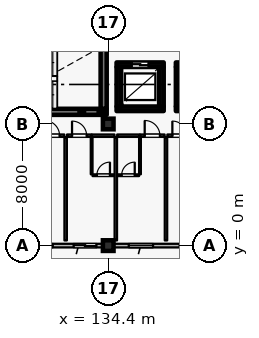
"""IFC4 building model, lengths in metres.
Left out: names, types, materials, properties, quantities, classifications, styles, units other than length and angle.
Written with IfcOpenShell. Run it as: python <this file> out.ifc"""

import sys

from ifc_helpers import new_model, si_unit, direction, frame, frame_2d, origin, origin_2d, place, context, subcontext, project, spatial, rectangle, hollow_rectangle, extrude, element, fill, save


model = new_model("IFC4")
c1 = context("Model", 3, precision=1e-05, world=origin(), true_north=direction((0.0, 1.0)))
c2 = subcontext(c1, "Body", "Model", "MODEL_VIEW")
j1 = project(units=[si_unit("LENGTHUNIT", "METRE"), si_unit("PLANEANGLEUNIT", "RADIAN")], contexts=[c1])
p1 = place(None, origin())
s1 = spatial("IfcSite", under=j1, at=p1, CompositionType="ELEMENT")
p2 = place(p1, origin())
s2 = spatial("IfcBuilding", under=s1, at=p2, CompositionType="ELEMENT")
p3 = place(p2, frame((0.0, 0.0, 28.8)))
s3 = spatial("IfcBuildingStorey", under=s2, at=p3, CompositionType="ELEMENT", Elevation=28.8)
for number, where, z_axis, x_axis in (
    (1, (134.4, 0.0, 0.0), (0.0, 0.0, 1.0), (1.0, 0.0, 0.0)),
    (2, (134.4, 8.0, 0.0), (0.0, 0.0, 1.0), (1.0, 0.0, 0.0)),
):
    element("IfcColumn", number, at=place(p3, frame(where, z_axis=z_axis, x_axis=x_axis)), inside=s3, PredefinedType="COLUMN", context=c2, shape_type="SweptSolid", body=[
        extrude(rectangle(XDim=0.7, YDim=0.7, at=origin_2d()), origin(), (0.0, 0.0, 1.0), 3.6),
    ])
p4 = place(p3, frame((134.05, 0.0, 0.0), z_axis=(0.0, 0.0, 1.0), x_axis=(-1.0, 0.0, 0.0)))
e3 = element("IfcWall", 3, at=p4, inside=s3, PredefinedType="SOLIDWALL", context=c2, shape_type="SweptSolid", body=[
    extrude(rectangle(XDim=7.7, YDim=0.24, at=frame_2d((3.85, 0.0))), origin(), (0.0, 0.0, 1.0), 2.93),
])
p5 = place(p4, frame((0.425, 0.0, 0.0)))
e4 = element("IfcOpeningElement", 4, at=p5, cuts=e3, PredefinedType="OPENING", context=c2, shape_type="SweptSolid", body=[
    extrude(rectangle(XDim=1.5, YDim=2.25, at=frame_2d((0.75, 1.125))), frame((0.0, 0.13, 0.0), z_axis=(0.0, -1.0, 0.0), x_axis=(1.0, 0.0, 0.0)), (0.0, 0.0, 1.0), 0.26),
])
p6 = place(p4, frame((3.3, 0.0, 0.8)))
e5 = element("IfcOpeningElement", 5, at=p6, cuts=e3, PredefinedType="OPENING", context=c2, shape_type="SweptSolid", body=[
    extrude(rectangle(XDim=1.6, YDim=1.6, at=frame_2d((0.8, 0.8))), frame((0.0, 0.13, 0.0), z_axis=(0.0, -1.0, 0.0), x_axis=(1.0, 0.0, 0.0)), (0.0, 0.0, 1.0), 0.26),
])
p7 = place(p4, frame((5.975, 0.0, 0.8)))
e6 = element("IfcOpeningElement", 6, at=p7, cuts=e3, PredefinedType="OPENING", context=c2, shape_type="SweptSolid", body=[
    extrude(rectangle(XDim=1.6, YDim=1.6, at=frame_2d((0.8, 0.8))), frame((0.0, 0.13, 0.0), z_axis=(0.0, -1.0, 0.0), x_axis=(1.0, 0.0, 0.0)), (0.0, 0.0, 1.0), 0.26),
])
p8 = place(p3, frame((142.45, 0.0, 0.0), z_axis=(0.0, 0.0, 1.0), x_axis=(-1.0, 0.0, 0.0)))
e7 = element("IfcWall", 7, at=p8, inside=s3, PredefinedType="SOLIDWALL", context=c2, shape_type="SweptSolid", body=[
    extrude(rectangle(XDim=7.7, YDim=0.24, at=frame_2d((3.85, 0.0))), origin(), (0.0, 0.0, 1.0), 2.93),
])
p9 = place(p8, frame((1.85, 0.0, 0.0)))
e8 = element("IfcOpeningElement", 8, at=p9, cuts=e7, PredefinedType="OPENING", context=c2, shape_type="SweptSolid", body=[
    extrude(rectangle(XDim=1.5, YDim=2.25, at=frame_2d((0.75, 1.125))), frame((0.0, 0.13, 0.0), z_axis=(0.0, -1.0, 0.0), x_axis=(1.0, 0.0, 0.0)), (0.0, 0.0, 1.0), 0.26),
])
p10 = place(p8, frame((5.1, 0.0, 0.8)))
e9 = element("IfcOpeningElement", 9, at=p10, cuts=e7, PredefinedType="OPENING", context=c2, shape_type="SweptSolid", body=[
    extrude(rectangle(XDim=1.6, YDim=1.6, at=frame_2d((0.8, 0.8))), frame((0.0, 0.13, 0.0), z_axis=(0.0, -1.0, 0.0), x_axis=(1.0, 0.0, 0.0)), (0.0, 0.0, 1.0), 0.26),
])
p11 = place(p3, frame((134.95, 9.0, 0.0), z_axis=(0.0, 0.0, 1.0), x_axis=(1.0, 0.0, 0.0)))
e10 = element("IfcWall", 10, at=p11, inside=s3, PredefinedType="SHEAR", context=c2, shape_type="SweptSolid", body=[
    extrude(rectangle(XDim=3.1, YDim=0.3, at=frame_2d((1.55, 0.0))), origin(), (0.0, 0.0, 1.0), 3.365),
])
p12 = place(p3, frame((137.9, 9.155, 0.0), z_axis=(0.0, 0.0, 1.0), x_axis=(0.0, 1.0, 0.0)))
e11 = element("IfcWall", 11, at=p12, inside=s3, PredefinedType="SHEAR", context=c2, shape_type="SweptSolid", body=[
    extrude(rectangle(XDim=2.59, YDim=0.3, at=frame_2d((1.295, 0.0))), origin(), (0.0, 0.0, 1.0), 3.365),
])
p13 = place(p3, frame((138.05, 11.9, 0.0), z_axis=(0.0, 0.0, 1.0), x_axis=(-1.0, 0.0, 0.0)))
e12 = element("IfcWall", 12, at=p13, inside=s3, PredefinedType="SHEAR", context=c2, shape_type="SweptSolid", body=[
    extrude(rectangle(XDim=3.1, YDim=0.3, at=frame_2d((1.55, 0.0))), origin(), (0.0, 0.0, 1.0), 3.365),
])
p14 = place(p13, frame((1.0, 0.0, 0.0)))
e13 = element("IfcOpeningElement", 13, at=p14, cuts=e12, PredefinedType="OPENING", context=c2, shape_type="SweptSolid", body=[
    extrude(rectangle(XDim=1.1, YDim=2.2, at=frame_2d((0.55, 1.1))), frame((0.0, 0.16, 0.0), z_axis=(0.0, -1.0, 0.0), x_axis=(1.0, 0.0, 0.0)), (0.0, 0.0, 1.0), 0.32),
])
p15 = place(p3, frame((135.1, 11.745, 0.0), z_axis=(0.0, 0.0, 1.0), x_axis=(0.0, -1.0, 0.0)))
e14 = element("IfcWall", 14, at=p15, inside=s3, PredefinedType="SHEAR", context=c2, shape_type="SweptSolid", body=[
    extrude(rectangle(XDim=2.59, YDim=0.3, at=frame_2d((1.295, 0.0))), origin(), (0.0, 0.0, 1.0), 3.365),
])
p16 = place(p3, frame((138.85, 9.0, 0.0), z_axis=(0.0, 0.0, 1.0), x_axis=(1.0, 0.0, 0.0)))
e15 = element("IfcWall", 15, at=p16, inside=s3, PredefinedType="SHEAR", context=c2, shape_type="SweptSolid", body=[
    extrude(rectangle(XDim=3.1, YDim=0.3, at=frame_2d((1.55, 0.0))), origin(), (0.0, 0.0, 1.0), 3.365),
])
p17 = place(p3, frame((141.95, 11.9, 0.0), z_axis=(0.0, 0.0, 1.0), x_axis=(-1.0, 0.0, 0.0)))
e16 = element("IfcWall", 16, at=p17, inside=s3, PredefinedType="SHEAR", context=c2, shape_type="SweptSolid", body=[
    extrude(rectangle(XDim=3.1, YDim=0.3, at=frame_2d((1.55, 0.0))), origin(), (0.0, 0.0, 1.0), 3.365),
])
p18 = place(p17, frame((1.0, 0.0, 0.0)))
e17 = element("IfcOpeningElement", 17, at=p18, cuts=e16, PredefinedType="OPENING", context=c2, shape_type="SweptSolid", body=[
    extrude(rectangle(XDim=1.1, YDim=2.2, at=frame_2d((0.55, 1.1))), frame((0.0, 0.16, 0.0), z_axis=(0.0, -1.0, 0.0), x_axis=(1.0, 0.0, 0.0)), (0.0, 0.0, 1.0), 0.32),
])
p19 = place(p3, frame((139.0, 11.745, 0.0), z_axis=(0.0, 0.0, 1.0), x_axis=(0.0, -1.0, 0.0)))
e18 = element("IfcWall", 18, at=p19, inside=s3, PredefinedType="SHEAR", context=c2, shape_type="SweptSolid", body=[
    extrude(rectangle(XDim=2.59, YDim=0.3, at=frame_2d((1.295, 0.0))), origin(), (0.0, 0.0, 1.0), 3.365),
])
p20 = place(p3, frame((126.1, 8.8, 0.0), z_axis=(0.0, 0.0, 1.0), x_axis=(1.0, 0.0, 0.0)))
e19 = element("IfcWall", 19, at=p20, inside=s3, PredefinedType="SHEAR", context=c2, shape_type="SweptSolid", body=[
    extrude(rectangle(XDim=8.2, YDim=0.4, at=frame_2d((4.1, 0.0))), origin(), (0.0, 0.0, 1.0), 3.365),
])
p21 = place(p3, frame((134.1, 9.005, 0.0), z_axis=(0.0, 0.0, 1.0), x_axis=(0.0, 1.0, 0.0)))
e20 = element("IfcWall", 20, at=p21, inside=s3, PredefinedType="SHEAR", context=c2, shape_type="SweptSolid", body=[
    extrude(rectangle(XDim=3.95, YDim=0.4, at=frame_2d((1.975, 0.0))), origin(), (0.0, 0.0, 1.0), 3.365),
])
for number, where, z_axis, x_axis in (
    (21, (132.66, 8.8, -1.8), (0.0, 0.0, 1.0), (1.0, 0.0, 0.0)),
    (22, (133.92, 8.8, -1.8), (0.0, 0.0, 1.0), (1.0, 0.0, 0.0)),
):
    element("IfcColumn", number, at=place(p3, frame(where, z_axis=z_axis, x_axis=x_axis)), inside=s3, PredefinedType="COLUMN", context=c2, shape_type="SweptSolid", body=[
        extrude(hollow_rectangle(XDim=0.3, YDim=0.3, WallThickness=0.012, at=origin_2d()), origin(), (0.0, 0.0, 1.0), 3.42),
    ])
p22 = place(p3, frame((129.89, 7.23, 0.0), z_axis=(0.0, 0.0, 1.0), x_axis=(1.0, 0.0, 0.0)))
e23 = element("IfcWall", 23, at=p22, inside=s3, PredefinedType="PARTITIONING", context=c2, shape_type="SweptSolid", body=[
    extrude(rectangle(XDim=1.62, YDim=0.16, at=frame_2d((0.81, 0.0))), origin(), (0.0, 0.0, 1.0), 3.365),
])
p23 = place(p22, frame((0.31, 0.0, 0.0)))
e24 = element("IfcOpeningElement", 24, at=p23, cuts=e23, PredefinedType="OPENING", context=c2, shape_type="SweptSolid", body=[
    extrude(rectangle(XDim=1.0, YDim=2.25, at=frame_2d((0.5, 1.125))), frame((0.0, 0.09, 0.0), z_axis=(0.0, -1.0, 0.0), x_axis=(1.0, 0.0, 0.0)), (0.0, 0.0, 1.0), 0.18),
])
p24 = place(p3, frame((131.69, 7.23, 0.0), z_axis=(0.0, 0.0, 1.0), x_axis=(1.0, 0.0, 0.0)))
e25 = element("IfcWall", 25, at=p24, inside=s3, PredefinedType="PARTITIONING", context=c2, shape_type="SweptSolid", body=[
    extrude(rectangle(XDim=1.62, YDim=0.16, at=frame_2d((0.81, 0.0))), origin(), (0.0, 0.0, 1.0), 3.365),
])
p25 = place(p24, frame((0.33, 0.0, 0.0)))
e26 = element("IfcOpeningElement", 26, at=p25, cuts=e25, PredefinedType="OPENING", context=c2, shape_type="SweptSolid", body=[
    extrude(rectangle(XDim=0.96, YDim=2.2, at=frame_2d((0.48, 1.1))), frame((0.0, 0.09, 0.0), z_axis=(0.0, -1.0, 0.0), x_axis=(1.0, 0.0, 0.0)), (0.0, 0.0, 1.0), 0.18),
])
p26 = place(p3, frame((133.32, 7.23, 0.0), z_axis=(0.0, 0.0, 1.0), x_axis=(1.0, 0.0, 0.0)))
e27 = element("IfcWall", 27, at=p26, inside=s3, PredefinedType="PARTITIONING", context=c2, shape_type="SweptSolid", body=[
    extrude(rectangle(XDim=1.49, YDim=0.16, at=frame_2d((0.745, 0.0))), origin(), (0.0, 0.0, 1.0), 3.365),
])
p27 = place(p3, frame((133.31, 4.69, 0.0), z_axis=(0.0, 0.0, 1.0), x_axis=(0.0, 1.0, 0.0)))
e28 = element("IfcWall", 28, at=p27, inside=s3, PredefinedType="PARTITIONING", context=c2, shape_type="SweptSolid", body=[
    extrude(rectangle(XDim=2.45, YDim=0.115, at=frame_2d((1.225, 0.0))), origin(), (0.0, 0.0, 1.0), 3.365),
])
p28 = place(p3, frame((133.37, 4.63, 0.0), z_axis=(0.0, 0.0, 1.0), x_axis=(1.0, 0.0, 0.0)))
e29 = element("IfcWall", 29, at=p28, inside=s3, PredefinedType="PARTITIONING", context=c2, shape_type="SweptSolid", body=[
    extrude(rectangle(XDim=1.43, YDim=0.115, at=frame_2d((0.715, 0.0))), origin(), (0.0, 0.0, 1.0), 3.365),
])
p29 = place(p28, frame((0.285, 0.0, 0.0)))
e30 = element("IfcOpeningElement", 30, at=p29, cuts=e29, PredefinedType="OPENING", context=c2, shape_type="SweptSolid", body=[
    extrude(rectangle(XDim=0.86, YDim=2.12, at=frame_2d((0.43, 1.06))), frame((0.0, 0.067, 0.0), z_axis=(0.0, -1.0, 0.0), x_axis=(1.0, 0.0, 0.0)), (0.0, 0.0, 1.0), 0.135),
])
p30 = place(p3, frame((131.6, 0.34, 0.0), z_axis=(0.0, 0.0, 1.0), x_axis=(0.0, 1.0, 0.0)))
e31 = element("IfcWall", 31, at=p30, inside=s3, PredefinedType="PARTITIONING", context=c2, shape_type="SweptSolid", body=[
    extrude(rectangle(XDim=6.8, YDim=0.16, at=frame_2d((3.4, 0.0))), origin(), (0.0, 0.0, 1.0), 3.365),
])
p31 = place(p3, frame((134.99, 7.23, 0.0), z_axis=(0.0, 0.0, 1.0), x_axis=(1.0, 0.0, 0.0)))
e32 = element("IfcWall", 32, at=p31, inside=s3, PredefinedType="PARTITIONING", context=c2, shape_type="SweptSolid", body=[
    extrude(rectangle(XDim=1.49, YDim=0.16, at=frame_2d((0.745, 0.0))), origin(), (0.0, 0.0, 1.0), 3.365),
])
p32 = place(p3, frame((136.49, 7.23, 0.0), z_axis=(0.0, 0.0, 1.0), x_axis=(1.0, 0.0, 0.0)))
e33 = element("IfcWall", 33, at=p32, inside=s3, PredefinedType="PARTITIONING", context=c2, shape_type="SweptSolid", body=[
    extrude(rectangle(XDim=1.62, YDim=0.16, at=frame_2d((0.81, 0.0))), origin(), (0.0, 0.0, 1.0), 3.365),
])
p33 = place(p32, frame((0.31, 0.0, 0.0)))
e34 = element("IfcOpeningElement", 34, at=p33, cuts=e33, PredefinedType="OPENING", context=c2, shape_type="SweptSolid", body=[
    extrude(rectangle(XDim=1.0, YDim=2.25, at=frame_2d((0.5, 1.125))), frame((0.0, 0.09, 0.0), z_axis=(0.0, -1.0, 0.0), x_axis=(1.0, 0.0, 0.0)), (0.0, 0.0, 1.0), 0.18),
])
p34 = place(p3, frame((136.49, 4.69, 0.0), z_axis=(0.0, 0.0, 1.0), x_axis=(0.0, 1.0, 0.0)))
e35 = element("IfcWall", 35, at=p34, inside=s3, PredefinedType="PARTITIONING", context=c2, shape_type="SweptSolid", body=[
    extrude(rectangle(XDim=2.45, YDim=0.115, at=frame_2d((1.225, 0.0))), origin(), (0.0, 0.0, 1.0), 3.365),
])
p35 = place(p3, frame((135.0, 4.63, 0.0), z_axis=(0.0, 0.0, 1.0), x_axis=(1.0, 0.0, 0.0)))
e36 = element("IfcWall", 36, at=p35, inside=s3, PredefinedType="PARTITIONING", context=c2, shape_type="SweptSolid", body=[
    extrude(rectangle(XDim=1.43, YDim=0.115, at=frame_2d((0.715, 0.0))), origin(), (0.0, 0.0, 1.0), 3.365),
])
p36 = place(p35, frame((0.285, 0.0, 0.0)))
e37 = element("IfcOpeningElement", 37, at=p36, cuts=e36, PredefinedType="OPENING", context=c2, shape_type="SweptSolid", body=[
    extrude(rectangle(XDim=0.86, YDim=2.12, at=frame_2d((0.43, 1.06))), frame((0.0, 0.067, 0.0), z_axis=(0.0, -1.0, 0.0), x_axis=(1.0, 0.0, 0.0)), (0.0, 0.0, 1.0), 0.135),
])
p37 = place(p3, frame((134.9, 0.34, 0.0), z_axis=(0.0, 0.0, 1.0), x_axis=(0.0, 1.0, 0.0)))
e38 = element("IfcWall", 38, at=p37, inside=s3, PredefinedType="PARTITIONING", context=c2, shape_type="SweptSolid", body=[
    extrude(rectangle(XDim=6.8, YDim=0.16, at=frame_2d((3.4, 0.0))), origin(), (0.0, 0.0, 1.0), 3.365),
])
p38 = place(p3, frame((138.29, 7.23, 0.0), z_axis=(0.0, 0.0, 1.0), x_axis=(1.0, 0.0, 0.0)))
e39 = element("IfcWall", 39, at=p38, inside=s3, PredefinedType="PARTITIONING", context=c2, shape_type="SweptSolid", body=[
    extrude(rectangle(XDim=1.62, YDim=0.16, at=frame_2d((0.81, 0.0))), origin(), (0.0, 0.0, 1.0), 3.365),
])
p39 = place(p38, frame((0.33, 0.0, 0.0)))
e40 = element("IfcOpeningElement", 40, at=p39, cuts=e39, PredefinedType="OPENING", context=c2, shape_type="SweptSolid", body=[
    extrude(rectangle(XDim=0.96, YDim=2.2, at=frame_2d((0.48, 1.1))), frame((0.0, 0.09, 0.0), z_axis=(0.0, -1.0, 0.0), x_axis=(1.0, 0.0, 0.0)), (0.0, 0.0, 1.0), 0.18),
])
p40 = place(p3, frame((138.2, 0.34, 0.0), z_axis=(0.0, 0.0, 1.0), x_axis=(0.0, 1.0, 0.0)))
e41 = element("IfcWall", 41, at=p40, inside=s3, PredefinedType="PARTITIONING", context=c2, shape_type="SweptSolid", body=[
    extrude(rectangle(XDim=6.8, YDim=0.16, at=frame_2d((3.4, 0.0))), origin(), (0.0, 0.0, 1.0), 3.365),
])
p41 = place(p5, origin())
e42 = element("IfcDoor", 42, at=p41, inside=s3, OperationType="SLIDING_TO_LEFT", PredefinedType="DOOR", context=c2, shape_type="SweptSolid", body=[
    extrude(rectangle(XDim=1.5, YDim=2.25, at=frame_2d((0.75, 1.125))), frame((0.0, 0.025, 0.0), z_axis=(0.0, -1.0, 0.0), x_axis=(1.0, 0.0, 0.0)), (0.0, 0.0, 1.0), 0.05),
])
fill(e4, e42)
p42 = place(p6, origin())
e43 = element("IfcWindow", 43, at=p42, inside=s3, PartitioningType="SINGLE_PANEL", PredefinedType="WINDOW", context=c2, shape_type="SweptSolid", body=[
    extrude(rectangle(XDim=1.6, YDim=1.6, at=frame_2d((0.8, 0.8))), frame((0.0, 0.03, 0.0), z_axis=(0.0, -1.0, 0.0), x_axis=(1.0, 0.0, 0.0)), (0.0, 0.0, 1.0), 0.06),
])
fill(e5, e43)
p43 = place(p10, origin())
e44 = element("IfcWindow", 44, at=p43, inside=s3, PartitioningType="SINGLE_PANEL", PredefinedType="WINDOW", context=c2, shape_type="SweptSolid", body=[
    extrude(rectangle(XDim=1.6, YDim=1.6, at=frame_2d((0.8, 0.8))), frame((0.0, 0.03, 0.0), z_axis=(0.0, -1.0, 0.0), x_axis=(1.0, 0.0, 0.0)), (0.0, 0.0, 1.0), 0.06),
])
fill(e9, e44)
p44 = place(p14, origin())
e45 = element("IfcDoor", 45, at=p44, inside=s3, OperationType="DOUBLE_DOOR_SLIDING", PredefinedType="DOOR", context=c2, shape_type="SweptSolid", body=[
    extrude(rectangle(XDim=1.1, YDim=2.2, at=frame_2d((0.55, 1.1))), frame((0.0, 0.025, 0.0), z_axis=(0.0, -1.0, 0.0), x_axis=(1.0, 0.0, 0.0)), (0.0, 0.0, 1.0), 0.05),
])
fill(e13, e45)
p45 = place(p23, origin())
e46 = element("IfcDoor", 46, at=p45, inside=s3, OperationType="SINGLE_SWING_LEFT", PredefinedType="DOOR", context=c2, shape_type="SweptSolid", body=[
    extrude(rectangle(XDim=1.0, YDim=2.25, at=frame_2d((0.5, 1.125))), frame((0.0, 0.025, 0.0), z_axis=(0.0, -1.0, 0.0), x_axis=(1.0, 0.0, 0.0)), (0.0, 0.0, 1.0), 0.05),
])
fill(e24, e46)
p46 = place(p25, origin())
e47 = element("IfcDoor", 47, at=p46, inside=s3, OperationType="SINGLE_SWING_LEFT", PredefinedType="DOOR", context=c2, shape_type="SweptSolid", body=[
    extrude(rectangle(XDim=0.96, YDim=2.2, at=frame_2d((0.48, 1.1))), frame((0.0, 0.025, 0.0), z_axis=(0.0, -1.0, 0.0), x_axis=(1.0, 0.0, 0.0)), (0.0, 0.0, 1.0), 0.05),
])
fill(e26, e47)
p47 = place(p29, origin())
e48 = element("IfcDoor", 48, at=p47, inside=s3, OperationType="SINGLE_SWING_RIGHT", PredefinedType="DOOR", context=c2, shape_type="SweptSolid", body=[
    extrude(rectangle(XDim=0.86, YDim=2.12, at=frame_2d((0.43, 1.06))), frame((0.0, 0.025, 0.0), z_axis=(0.0, -1.0, 0.0), x_axis=(1.0, 0.0, 0.0)), (0.0, 0.0, 1.0), 0.05),
])
fill(e30, e48)
p48 = place(p33, origin())
e49 = element("IfcDoor", 49, at=p48, inside=s3, OperationType="SINGLE_SWING_LEFT", PredefinedType="DOOR", context=c2, shape_type="SweptSolid", body=[
    extrude(rectangle(XDim=1.0, YDim=2.25, at=frame_2d((0.5, 1.125))), frame((0.0, 0.025, 0.0), z_axis=(0.0, -1.0, 0.0), x_axis=(1.0, 0.0, 0.0)), (0.0, 0.0, 1.0), 0.05),
])
fill(e34, e49)
p49 = place(p36, origin())
e50 = element("IfcDoor", 50, at=p49, inside=s3, OperationType="SINGLE_SWING_RIGHT", PredefinedType="DOOR", context=c2, shape_type="SweptSolid", body=[
    extrude(rectangle(XDim=0.86, YDim=2.12, at=frame_2d((0.43, 1.06))), frame((0.0, 0.025, 0.0), z_axis=(0.0, -1.0, 0.0), x_axis=(1.0, 0.0, 0.0)), (0.0, 0.0, 1.0), 0.05),
])
fill(e37, e50)
p50 = place(p39, origin())
e51 = element("IfcDoor", 51, at=p50, inside=s3, OperationType="SINGLE_SWING_LEFT", PredefinedType="DOOR", context=c2, shape_type="SweptSolid", body=[
    extrude(rectangle(XDim=0.96, YDim=2.2, at=frame_2d((0.48, 1.1))), frame((0.0, 0.025, 0.0), z_axis=(0.0, -1.0, 0.0), x_axis=(1.0, 0.0, 0.0)), (0.0, 0.0, 1.0), 0.05),
])
fill(e40, e51)
save(model, sys.argv[1])
